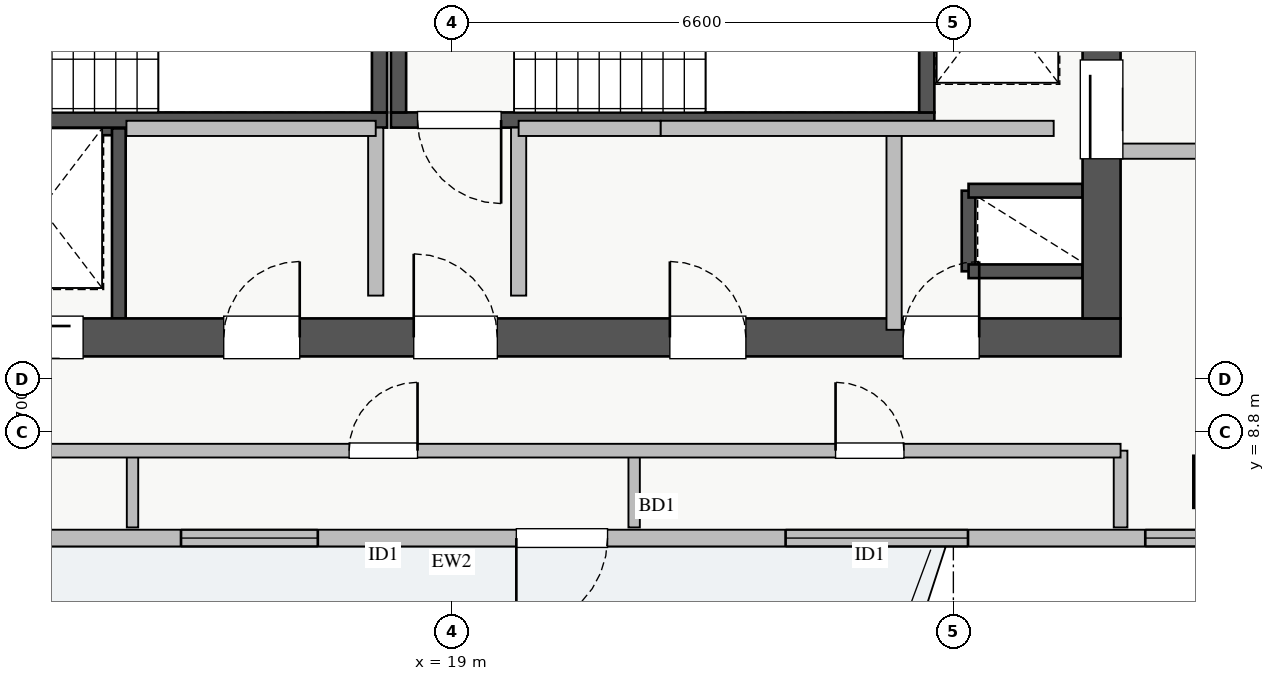
"""IFC4 building model, lengths in metres.
Left out: names, types, materials, properties, quantities, classifications, styles, units other than length and angle.
Written with IfcOpenShell. Run it as: python <this file> out.ifc"""

import sys

from ifc_helpers import new_model, si_unit, direction, frame, frame_2d, origin, origin_2d, place, context, subcontext, project, spatial, rectangle, extrude, source, transform, mapped, element, fill, save


model = new_model("IFC4")
c1 = context("Model", 3, precision=1e-05, world=origin(), true_north=direction((0.0, 1.0)))
c2 = subcontext(c1, "Body", "Model", "MODEL_VIEW")
j1 = project(units=[si_unit("LENGTHUNIT", "METRE"), si_unit("PLANEANGLEUNIT", "RADIAN")], contexts=[c1])
p1 = place(None, origin())
s1 = spatial("IfcSite", under=j1, at=p1, CompositionType="ELEMENT")
p2 = place(p1, origin())
s2 = spatial("IfcBuilding", under=s1, at=p2, CompositionType="ELEMENT")
p3 = place(p2, frame((0.0, 0.0, 256.75)))
s3 = spatial("IfcBuildingStorey", under=s2, at=p3, CompositionType="ELEMENT", Elevation=256.75)
p4 = place(p3, frame((12.68, 12.8, 0.0), z_axis=(0.0, 0.0, 1.0), x_axis=(1.0, 0.0, 0.0)))
e1 = element("IfcWall", 1, at=p4, inside=s3, PredefinedType="SHEAR", context=c2, shape_type="SweptSolid", body=[
    extrude(rectangle(XDim=1.94, YDim=0.18, at=frame_2d((0.97, 0.0))), origin(), (0.0, 0.0, 1.0), 3.07),
])
p5 = place(p3, frame((14.62, 10.3, 0.0), z_axis=(0.0, 0.0, 1.0), x_axis=(0.0, 1.0, 0.0)))
e2 = element("IfcWall", 2, at=p5, inside=s3, PredefinedType="SHEAR", context=c2, shape_type="SweptSolid", body=[
    extrude(rectangle(XDim=2.5, YDim=0.18, at=frame_2d((1.25, 0.0))), origin(), (0.0, 0.0, 1.0), 3.07),
])
p6 = place(p3, frame((25.8, 10.92, 0.0), z_axis=(0.0, 0.0, 1.0), x_axis=(0.0, 1.0, 0.0)))
e3 = element("IfcWall", 3, at=p6, inside=s3, PredefinedType="SHEAR", context=c2, shape_type="SweptSolid", body=[
    extrude(rectangle(XDim=1.06, YDim=0.18, at=frame_2d((0.53, 0.0))), origin(), (0.0, 0.0, 1.0), 3.07),
])
for number, where, z_axis, x_axis in (
    (4, (25.8, 11.98, 0.0), (0.0, 0.0, 1.0), (1.0, 0.0, 0.0)),
    (5, (25.8, 10.92, 0.0), (0.0, 0.0, 1.0), (1.0, 0.0, 0.0)),
):
    element("IfcWall", number, at=place(p3, frame(where, z_axis=z_axis, x_axis=x_axis)), inside=s3, PredefinedType="SHEAR", context=c2, shape_type="SweptSolid", body=[
        extrude(rectangle(XDim=1.5, YDim=0.18, at=frame_2d((0.75, 0.0))), origin(), (0.0, 0.0, 1.0), 3.07),
    ])
p7 = place(p3, frame((10.7, 12.91, 0.0), z_axis=(0.0, 0.0, 1.0), x_axis=(1.0, 0.0, 0.0)))
e6 = element("IfcWall", 6, at=p7, inside=s3, PredefinedType="SHEAR", context=c2, shape_type="SweptSolid", body=[
    extrude(rectangle(XDim=7.45, YDim=0.2, at=frame_2d((3.725, 0.0))), origin(), (0.0, 0.0, 1.0), 3.25),
])
p8 = place(p7, frame((0.35, 0.0, 0.0)))
e7 = element("IfcOpeningElement", 7, at=p8, cuts=e6, PredefinedType="OPENING", context=c2, shape_type="SweptSolid", body=[
    extrude(rectangle(XDim=1.1, YDim=2.05, at=frame_2d((0.55, 1.025))), frame((0.0, 0.11, 0.0), z_axis=(0.0, -1.0, 0.0), x_axis=(1.0, 0.0, 0.0)), (0.0, 0.0, 1.0), 0.22),
])
p9 = place(p3, frame((18.05, 13.01, 0.0), z_axis=(0.0, 0.0, 1.0), x_axis=(0.0, 1.0, 0.0)))
e8 = element("IfcWall", 8, at=p9, inside=s3, PredefinedType="SHEAR", context=c2, shape_type="SweptSolid", body=[
    extrude(rectangle(XDim=2.94, YDim=0.2, at=frame_2d((1.47, 0.0))), origin(), (0.0, 0.0, 1.0), 3.25),
])
p10 = place(p3, frame((18.2, 12.91, 0.0), z_axis=(0.0, 0.0, 1.0), x_axis=(1.0, 0.0, 0.0)))
e9 = element("IfcWall", 9, at=p10, inside=s3, PredefinedType="SHEAR", context=c2, shape_type="SweptSolid", body=[
    extrude(rectangle(XDim=7.15, YDim=0.2, at=frame_2d((3.575, 0.0))), origin(), (0.0, 0.0, 1.0), 3.25),
])
p11 = place(p10, frame((0.35, 0.0, 0.0)))
e10 = element("IfcOpeningElement", 10, at=p11, cuts=e9, PredefinedType="OPENING", context=c2, shape_type="SweptSolid", body=[
    extrude(rectangle(XDim=1.1, YDim=2.05, at=frame_2d((0.55, 1.025))), frame((0.0, 0.11, 0.0), z_axis=(0.0, -1.0, 0.0), x_axis=(1.0, 0.0, 0.0)), (0.0, 0.0, 1.0), 0.22),
])
for number, where, z_axis, x_axis in (
    (11, (18.3, 13.01, 0.0), (0.0, 0.0, 1.0), (0.0, 1.0, 0.0)),
    (12, (25.25, 13.01, 0.0), (0.0, 0.0, 1.0), (0.0, 1.0, 0.0)),
):
    element("IfcWall", number, at=place(p3, frame(where, z_axis=z_axis, x_axis=x_axis)), inside=s3, PredefinedType="SHEAR", context=c2, shape_type="SweptSolid", body=[
        extrude(rectangle(XDim=2.94, YDim=0.2, at=frame_2d((1.47, 0.0))), origin(), (0.0, 0.0, 1.0), 3.25),
    ])
p12 = place(p3, frame((10.2, 10.05, 0.0), z_axis=(0.0, 0.0, 1.0), x_axis=(1.0, 0.0, 0.0)))
e13 = element("IfcWall", 13, at=p12, inside=s3, PredefinedType="SHEAR", context=c2, shape_type="SweptSolid", body=[
    extrude(rectangle(XDim=17.6, YDim=0.5, at=frame_2d((8.8, 0.0))), origin(), (0.0, 0.0, 1.0), 3.25),
])
p13 = place(p12, frame((1.15, 0.0, 0.0)))
e14 = element("IfcOpeningElement", 14, at=p13, cuts=e13, PredefinedType="OPENING", context=c2, shape_type="SweptSolid", body=[
    extrude(rectangle(XDim=1.1, YDim=2.05, at=frame_2d((0.55, 1.025))), frame((0.0, 0.26, 0.0), z_axis=(0.0, -1.0, 0.0), x_axis=(1.0, 0.0, 0.0)), (0.0, 0.0, 1.0), 0.52),
])
p14 = place(p12, frame((8.3, 0.0, 0.0)))
e15 = element("IfcOpeningElement", 15, at=p14, cuts=e13, PredefinedType="OPENING", context=c2, shape_type="SweptSolid", body=[
    extrude(rectangle(XDim=1.1, YDim=2.05, at=frame_2d((0.55, 1.025))), frame((0.0, 0.26, 0.0), z_axis=(0.0, -1.0, 0.0), x_axis=(1.0, 0.0, 0.0)), (0.0, 0.0, 1.0), 0.52),
])
p15 = place(p12, frame((2.85, 0.0, 0.0)))
e16 = element("IfcOpeningElement", 16, at=p15, cuts=e13, PredefinedType="OPENING", context=c2, shape_type="SweptSolid", body=[
    extrude(rectangle(XDim=1.1, YDim=2.05, at=frame_2d((0.55, 1.025))), frame((0.0, 0.26, 0.0), z_axis=(0.0, -1.0, 0.0), x_axis=(1.0, 0.0, 0.0)), (0.0, 0.0, 1.0), 0.52),
])
p16 = place(p12, frame((5.8, 0.0, 0.0)))
e17 = element("IfcOpeningElement", 17, at=p16, cuts=e13, PredefinedType="OPENING", context=c2, shape_type="SweptSolid", body=[
    extrude(rectangle(XDim=1.0, YDim=2.05, at=frame_2d((0.5, 1.025))), frame((0.0, 0.26, 0.0), z_axis=(0.0, -1.0, 0.0), x_axis=(1.0, 0.0, 0.0)), (0.0, 0.0, 1.0), 0.52),
])
p17 = place(p12, frame((14.74, 0.0, 0.0)))
e18 = element("IfcOpeningElement", 18, at=p17, cuts=e13, PredefinedType="OPENING", context=c2, shape_type="SweptSolid", body=[
    extrude(rectangle(XDim=1.0, YDim=2.05, at=frame_2d((0.5, 1.025))), frame((0.0, 0.26, 0.0), z_axis=(0.0, -1.0, 0.0), x_axis=(1.0, 0.0, 0.0)), (0.0, 0.0, 1.0), 0.52),
])
p18 = place(p12, frame((11.67, 0.0, 0.0)))
e19 = element("IfcOpeningElement", 19, at=p18, cuts=e13, PredefinedType="OPENING", context=c2, shape_type="SweptSolid", body=[
    extrude(rectangle(XDim=1.0, YDim=2.05, at=frame_2d((0.5, 1.025))), frame((0.0, 0.26, 0.0), z_axis=(0.0, -1.0, 0.0), x_axis=(1.0, 0.0, 0.0)), (0.0, 0.0, 1.0), 0.52),
])
p19 = place(p3, frame((27.55, 10.3, 0.0), z_axis=(0.0, 0.0, 1.0), x_axis=(0.0, 1.0, 0.0)))
e20 = element("IfcWall", 20, at=p19, inside=s3, PredefinedType="SHEAR", context=c2, shape_type="SweptSolid", body=[
    extrude(rectangle(XDim=6.2, YDim=0.5, at=frame_2d((3.1, 0.0))), origin(), (0.0, 0.0, 1.0), 3.25),
])
p20 = place(p19, frame((2.1, 0.0, 0.0)))
e21 = element("IfcOpeningElement", 21, at=p20, cuts=e20, PredefinedType="OPENING", context=c2, shape_type="SweptSolid", body=[
    extrude(rectangle(XDim=1.3, YDim=2.05, at=frame_2d((0.65, 1.025))), frame((0.0, 0.26, 0.0), z_axis=(0.0, -1.0, 0.0), x_axis=(1.0, 0.0, 0.0)), (0.0, 0.0, 1.0), 0.52),
])
m1 = source(origin(), c2, "Body", "SweptSolid", [
    extrude(rectangle(XDim=0.65, YDim=0.65, at=origin_2d()), origin(), (0.0, 0.0, 1.0), 3.25),
])
p21 = place(p3, frame((29.1, 8.15, 0.0), z_axis=(0.0, 0.0, 1.0), x_axis=(1.0, 0.0, 0.0)))
e22 = element("IfcColumn", 22, at=p21, inside=s3, PredefinedType="COLUMN", context=c2, shape_type="MappedRepresentation", body=[
    mapped(m1, transform((0.0, 0.0, 0.0), x_axis=(1.0, 0.0, 0.0), y_axis=(0.0, 1.0, 0.0), z_axis=(0.0, 0.0, 1.0), scale=1.0)),
])
p22 = place(p3, frame((8.35, 7.41, 0.0), z_axis=(0.0, 0.0, 1.0), x_axis=(1.0, 0.0, 0.0)))
e23 = element("IfcWall", 23, at=p22, inside=s3, PredefinedType="STANDARD", context=c2, shape_type="SweptSolid", body=[
    extrude(rectangle(XDim=21.3, YDim=0.22, at=frame_2d((10.65, 0.0))), origin(), (0.0, 0.0, 1.0), 2.61),
])
p23 = place(p22, frame((11.5, 0.0, 0.0)))
e24 = element("IfcOpeningElement", 24, at=p23, cuts=e23, PredefinedType="OPENING", context=c2, shape_type="SweptSolid", body=[
    extrude(rectangle(XDim=1.2, YDim=2.1, at=frame_2d((0.6, 1.05))), frame((0.0, 0.12, 0.0), z_axis=(0.0, -1.0, 0.0), x_axis=(1.0, 0.0, 0.0)), (0.0, 0.0, 1.0), 0.24),
])
p24 = place(p22, frame((1.463, 0.0, 0.9)))
e25 = element("IfcOpeningElement", 25, at=p24, cuts=e23, PredefinedType="OPENING", context=c2, shape_type="SweptSolid", body=[
    extrude(rectangle(XDim=2.4, YDim=1.48, at=frame_2d((1.2, 0.74))), frame((0.0, 0.12, 0.0), z_axis=(0.0, -1.0, 0.0), x_axis=(1.0, 0.0, 0.0)), (0.0, 0.0, 1.0), 0.24),
])
p25 = place(p22, frame((7.088, 0.0, 0.9)))
e26 = element("IfcOpeningElement", 26, at=p25, cuts=e23, PredefinedType="OPENING", context=c2, shape_type="SweptSolid", body=[
    extrude(rectangle(XDim=1.8, YDim=1.45, at=frame_2d((0.9, 0.725))), frame((0.0, 0.12, 0.0), z_axis=(0.0, -1.0, 0.0), x_axis=(1.0, 0.0, 0.0)), (0.0, 0.0, 1.0), 0.24),
])
p26 = place(p22, frame((19.775, 0.0, 0.9)))
e27 = element("IfcOpeningElement", 27, at=p26, cuts=e23, PredefinedType="OPENING", context=c2, shape_type="SweptSolid", body=[
    extrude(rectangle(XDim=1.2, YDim=1.4, at=frame_2d((0.6, 0.7))), frame((0.0, 0.12, 0.0), z_axis=(0.0, -1.0, 0.0), x_axis=(1.0, 0.0, 0.0)), (0.0, 0.0, 1.0), 0.24),
])
p27 = place(p22, frame((15.042, 0.0, 0.9)))
e28 = element("IfcOpeningElement", 28, at=p27, cuts=e23, PredefinedType="OPENING", context=c2, shape_type="SweptSolid", body=[
    extrude(rectangle(XDim=2.4, YDim=1.5, at=frame_2d((1.2, 0.75))), frame((0.0, 0.12, 0.0), z_axis=(0.0, -1.0, 0.0), x_axis=(1.0, 0.0, 0.0)), (0.0, 0.0, 1.0), 0.24),
])
p28 = place(p3, frame((27.8, 12.5, 0.0), z_axis=(0.0, 0.0, 1.0), x_axis=(1.0, 0.0, 0.0)))
e29 = element("IfcWall", 29, at=p28, inside=s3, PredefinedType="PARTITIONING", context=c2, shape_type="SweptSolid", body=[
    extrude(rectangle(XDim=3.1, YDim=0.2, at=frame_2d((1.55, 0.0))), origin(), (0.0, 0.0, 1.0), 3.07),
])
for number, where, z_axis, x_axis in (
    (30, (18.0, 10.6, 0.0), (0.0, 0.0, 1.0), (0.0, 1.0, 0.0)),
    (31, (19.88, 10.6, 0.0), (0.0, 0.0, 1.0), (0.0, 1.0, 0.0)),
):
    element("IfcWall", number, at=place(p3, frame(where, z_axis=z_axis, x_axis=x_axis)), inside=s3, PredefinedType="PARTITIONING", context=c2, shape_type="SweptSolid", body=[
        extrude(rectangle(XDim=2.21, YDim=0.2, at=frame_2d((1.105, 0.0))), origin(), (0.0, 0.0, 1.0), 3.07),
    ])
p29 = place(p3, frame((14.72, 12.8, 0.0), z_axis=(0.0, 0.0, 1.0), x_axis=(1.0, 0.0, 0.0)))
e32 = element("IfcWall", 32, at=p29, inside=s3, PredefinedType="PARTITIONING", context=c2, shape_type="SweptSolid", body=[
    extrude(rectangle(XDim=3.28, YDim=0.2, at=frame_2d((1.64, 0.0))), origin(), (0.0, 0.0, 1.0), 3.07),
])
p30 = place(p3, frame((24.82, 10.15, 0.0), z_axis=(0.0, 0.0, 1.0), x_axis=(0.0, 1.0, 0.0)))
e33 = element("IfcWall", 33, at=p30, inside=s3, PredefinedType="PARTITIONING", context=c2, shape_type="SweptSolid", body=[
    extrude(rectangle(XDim=2.65, YDim=0.2, at=frame_2d((1.325, 0.0))), origin(), (0.0, 0.0, 1.0), 3.07),
])
p31 = place(p3, frame((19.88, 12.8, 0.0), z_axis=(0.0, 0.0, 1.0), x_axis=(1.0, 0.0, 0.0)))
e34 = element("IfcWall", 34, at=p31, inside=s3, PredefinedType="PARTITIONING", context=c2, shape_type="SweptSolid", body=[
    extrude(rectangle(XDim=1.87, YDim=0.2, at=frame_2d((0.935, 0.0))), origin(), (0.0, 0.0, 1.0), 3.07),
])
p32 = place(p3, frame((21.75, 12.8, 0.0), z_axis=(0.0, 0.0, 1.0), x_axis=(1.0, 0.0, 0.0)))
e35 = element("IfcWall", 35, at=p32, inside=s3, PredefinedType="PARTITIONING", context=c2, shape_type="SweptSolid", body=[
    extrude(rectangle(XDim=5.17, YDim=0.2, at=frame_2d((2.585, 0.0))), origin(), (0.0, 0.0, 1.0), 3.07),
])
p33 = place(p3, frame((27.8, 7.55, 0.0), z_axis=(0.0, 0.0, 1.0), x_axis=(0.0, 1.0, 0.0)))
e36 = element("IfcWall", 36, at=p33, inside=s3, PredefinedType="PARTITIONING", context=c2, shape_type="SweptSolid", body=[
    extrude(rectangle(XDim=1.01, YDim=0.18, at=frame_2d((0.505, 0.0))), origin(), (0.0, 0.0, 1.0), 3.07),
])
for number, where, z_axis, x_axis in (
    (37, (14.8, 7.55, 0.0), (0.0, 0.0, 1.0), (0.0, 1.0, 0.0)),
    (38, (21.4, 7.55, 0.0), (0.0, 0.0, 1.0), (0.0, 1.0, 0.0)),
):
    element("IfcWall", number, at=place(p3, frame(where, z_axis=z_axis, x_axis=x_axis)), inside=s3, PredefinedType="PARTITIONING", context=c2, shape_type="SweptSolid", body=[
        extrude(rectangle(XDim=1.01, YDim=0.15, at=frame_2d((0.505, 0.0))), origin(), (0.0, 0.0, 1.0), 3.07),
    ])
p34 = place(p3, frame((8.85, 8.56, 0.0), z_axis=(0.0, 0.0, 1.0), x_axis=(1.0, 0.0, 0.0)))
e39 = element("IfcWall", 39, at=p34, inside=s3, PredefinedType="PARTITIONING", context=c2, shape_type="SweptSolid", body=[
    extrude(rectangle(XDim=18.95, YDim=0.18, at=frame_2d((9.475, 0.0))), origin(), (0.0, 0.0, 1.0), 3.07),
])
p35 = place(p34, frame((2.8, 0.0, 0.0)))
e40 = element("IfcOpeningElement", 40, at=p35, cuts=e39, PredefinedType="OPENING", context=c2, shape_type="SweptSolid", body=[
    extrude(rectangle(XDim=0.9, YDim=2.05, at=frame_2d((0.45, 1.025))), frame((0.0, 0.1, 0.0), z_axis=(0.0, -1.0, 0.0), x_axis=(1.0, 0.0, 0.0)), (0.0, 0.0, 1.0), 0.2),
])
p36 = place(p34, frame((8.8, 0.0, 0.0)))
e41 = element("IfcOpeningElement", 41, at=p36, cuts=e39, PredefinedType="OPENING", context=c2, shape_type="SweptSolid", body=[
    extrude(rectangle(XDim=0.9, YDim=2.05, at=frame_2d((0.45, 1.025))), frame((0.0, 0.1, 0.0), z_axis=(0.0, -1.0, 0.0), x_axis=(1.0, 0.0, 0.0)), (0.0, 0.0, 1.0), 0.2),
])
p37 = place(p34, frame((15.2, 0.0, 0.0)))
e42 = element("IfcOpeningElement", 42, at=p37, cuts=e39, PredefinedType="OPENING", context=c2, shape_type="SweptSolid", body=[
    extrude(rectangle(XDim=0.9, YDim=2.05, at=frame_2d((0.45, 1.025))), frame((0.0, 0.1, 0.0), z_axis=(0.0, -1.0, 0.0), x_axis=(1.0, 0.0, 0.0)), (0.0, 0.0, 1.0), 0.2),
])
m2 = source(origin(), c2, "Body", "SweptSolid", [
    extrude(rectangle(XDim=1.2, YDim=2.1, at=frame_2d((0.6, 1.05))), frame((0.0, 0.025, 0.0), z_axis=(0.0, -1.0, 0.0), x_axis=(1.0, 0.0, 0.0)), (0.0, 0.0, 1.0), 0.05),
])
p38 = place(p23, frame((1.2, 0.0, 0.0), z_axis=(0.0, 0.0, 1.0), x_axis=(-1.0, 0.0, 0.0)))
e43 = element("IfcDoor", 43, at=p38, inside=s3, OperationType="SINGLE_SWING_LEFT", PredefinedType="DOOR", context=c2, shape_type="MappedRepresentation", body=[
    mapped(m2, transform((0.0, 0.0, 0.0), x_axis=(1.0, 0.0, 0.0), y_axis=(0.0, 1.0, 0.0), z_axis=(0.0, 0.0, 1.0), scale=1.0)),
])
fill(e24, e43)
m3 = source(origin(), c2, "Body", "SweptSolid", [
    extrude(rectangle(XDim=1.8, YDim=1.45, at=frame_2d((0.9, 0.725))), frame((0.0, 0.03, 0.0), z_axis=(0.0, -1.0, 0.0), x_axis=(1.0, 0.0, 0.0)), (0.0, 0.0, 1.0), 0.06),
])
p39 = place(p25, origin())
e44 = element("IfcWindow", 44, at=p39, inside=s3, PartitioningType="DOUBLE_PANEL_VERTICAL", PredefinedType="WINDOW", context=c2, shape_type="MappedRepresentation", body=[
    mapped(m3, transform((0.0, 0.0, 0.0), x_axis=(1.0, 0.0, 0.0), y_axis=(0.0, 1.0, 0.0), z_axis=(0.0, 0.0, 1.0), scale=1.0)),
])
fill(e26, e44)
m4 = source(origin(), c2, "Body", "SweptSolid", [
    extrude(rectangle(XDim=1.2, YDim=1.4, at=frame_2d((0.6, 0.7))), frame((0.0, 0.03, 0.0), z_axis=(0.0, -1.0, 0.0), x_axis=(1.0, 0.0, 0.0)), (0.0, 0.0, 1.0), 0.06),
])
p40 = place(p26, origin())
e45 = element("IfcWindow", 45, at=p40, inside=s3, PartitioningType="TRIPLE_PANEL_VERTICAL", PredefinedType="WINDOW", context=c2, shape_type="MappedRepresentation", body=[
    mapped(m4, transform((0.0, 0.0, 0.0), x_axis=(1.0, 0.0, 0.0), y_axis=(0.0, 1.0, 0.0), z_axis=(0.0, 0.0, 1.0), scale=1.0)),
])
fill(e27, e45)
m5 = source(origin(), c2, "Body", "SweptSolid", [
    extrude(rectangle(XDim=1.3, YDim=2.05, at=frame_2d((0.65, 1.025))), frame((0.0, 0.025, 0.0), z_axis=(0.0, -1.0, 0.0), x_axis=(1.0, 0.0, 0.0)), (0.0, 0.0, 1.0), 0.05),
])
p41 = place(p20, origin())
e46 = element("IfcDoor", 46, at=p41, inside=s3, OperationType="SLIDING_TO_RIGHT", PredefinedType="DOOR", context=c2, shape_type="MappedRepresentation", body=[
    mapped(m5, transform((0.0, 0.0, 0.0), x_axis=(1.0, 0.0, 0.0), y_axis=(0.0, 1.0, 0.0), z_axis=(0.0, 0.0, 1.0), scale=1.0)),
])
fill(e21, e46)
m6 = source(origin(), c2, "Body", "SweptSolid", [
    extrude(rectangle(XDim=1.1, YDim=2.05, at=frame_2d((0.55, 1.025))), frame((0.0, 0.025, 0.0), z_axis=(0.0, -1.0, 0.0), x_axis=(1.0, 0.0, 0.0)), (0.0, 0.0, 1.0), 0.05),
])
p42 = place(p14, origin())
e47 = element("IfcDoor", 47, at=p42, inside=s3, OperationType="SINGLE_SWING_LEFT", PredefinedType="DOOR", context=c2, shape_type="MappedRepresentation", body=[
    mapped(m6, transform((0.0, 0.0, 0.0), x_axis=(1.0, 0.0, 0.0), y_axis=(0.0, 1.0, 0.0), z_axis=(0.0, 0.0, 1.0), scale=1.0)),
])
fill(e15, e47)
p43 = place(p11, frame((1.1, 0.0, 0.0), z_axis=(0.0, 0.0, 1.0), x_axis=(-1.0, 0.0, 0.0)))
e48 = element("IfcDoor", 48, at=p43, inside=s3, OperationType="SINGLE_SWING_RIGHT", PredefinedType="DOOR", context=c2, shape_type="MappedRepresentation", body=[
    mapped(m6, transform((0.0, 0.0, 0.0), x_axis=(1.0, 0.0, 0.0), y_axis=(0.0, 1.0, 0.0), z_axis=(0.0, 0.0, 1.0), scale=1.0)),
])
fill(e10, e48)
p44 = place(p15, origin())
e49 = element("IfcDoor", 49, at=p44, inside=s3, OperationType="SLIDING_TO_RIGHT", PredefinedType="DOOR", context=c2, shape_type="MappedRepresentation", body=[
    mapped(m6, transform((0.0, 0.0, 0.0), x_axis=(1.0, 0.0, 0.0), y_axis=(0.0, 1.0, 0.0), z_axis=(0.0, 0.0, 1.0), scale=1.0)),
])
fill(e16, e49)
m7 = source(origin(), c2, "Body", "SweptSolid", [
    extrude(rectangle(XDim=1.0, YDim=2.05, at=frame_2d((0.5, 1.025))), frame((0.0, 0.025, 0.0), z_axis=(0.0, -1.0, 0.0), x_axis=(1.0, 0.0, 0.0)), (0.0, 0.0, 1.0), 0.05),
])
p45 = place(p16, origin())
e50 = element("IfcDoor", 50, at=p45, inside=s3, OperationType="SINGLE_SWING_RIGHT", PredefinedType="DOOR", context=c2, shape_type="MappedRepresentation", body=[
    mapped(m7, transform((0.0, 0.0, 0.0), x_axis=(1.0, 0.0, 0.0), y_axis=(0.0, 1.0, 0.0), z_axis=(0.0, 0.0, 1.0), scale=1.0)),
])
fill(e17, e50)
p46 = place(p17, origin())
e51 = element("IfcDoor", 51, at=p46, inside=s3, OperationType="SINGLE_SWING_RIGHT", PredefinedType="DOOR", context=c2, shape_type="MappedRepresentation", body=[
    mapped(m7, transform((0.0, 0.0, 0.0), x_axis=(1.0, 0.0, 0.0), y_axis=(0.0, 1.0, 0.0), z_axis=(0.0, 0.0, 1.0), scale=1.0)),
])
fill(e18, e51)
p47 = place(p18, origin())
e52 = element("IfcDoor", 52, at=p47, inside=s3, OperationType="SINGLE_SWING_LEFT", PredefinedType="DOOR", context=c2, shape_type="MappedRepresentation", body=[
    mapped(m7, transform((0.0, 0.0, 0.0), x_axis=(1.0, 0.0, 0.0), y_axis=(0.0, 1.0, 0.0), z_axis=(0.0, 0.0, 1.0), scale=1.0)),
])
fill(e19, e52)
m8 = source(origin(), c2, "Body", "SweptSolid", [
    extrude(rectangle(XDim=0.9, YDim=2.05, at=frame_2d((0.45, 1.025))), frame((0.0, 0.025, 0.0), z_axis=(0.0, -1.0, 0.0), x_axis=(1.0, 0.0, 0.0)), (0.0, 0.0, 1.0), 0.05),
])
p48 = place(p36, origin())
e53 = element("IfcDoor", 53, at=p48, inside=s3, OperationType="SINGLE_SWING_RIGHT", PredefinedType="DOOR", context=c2, shape_type="MappedRepresentation", body=[
    mapped(m8, transform((0.0, 0.0, 0.0), x_axis=(1.0, 0.0, 0.0), y_axis=(0.0, 1.0, 0.0), z_axis=(0.0, 0.0, 1.0), scale=1.0)),
])
fill(e41, e53)
p49 = place(p37, origin())
e54 = element("IfcDoor", 54, at=p49, inside=s3, OperationType="SINGLE_SWING_LEFT", PredefinedType="DOOR", context=c2, shape_type="MappedRepresentation", body=[
    mapped(m8, transform((0.0, 0.0, 0.0), x_axis=(1.0, 0.0, 0.0), y_axis=(0.0, 1.0, 0.0), z_axis=(0.0, 0.0, 1.0), scale=1.0)),
])
fill(e42, e54)
m9 = source(origin(), c2, "Body", "SweptSolid", [
    extrude(rectangle(XDim=2.4, YDim=1.5, at=frame_2d((1.2, 0.75))), frame((0.0, 0.03, 0.0), z_axis=(0.0, -1.0, 0.0), x_axis=(1.0, 0.0, 0.0)), (0.0, 0.0, 1.0), 0.06),
])
p50 = place(p27, origin())
e55 = element("IfcWindow", 55, at=p50, inside=s3, PartitioningType="TRIPLE_PANEL_VERTICAL", PredefinedType="WINDOW", context=c2, shape_type="MappedRepresentation", body=[
    mapped(m9, transform((0.0, 0.0, 0.0), x_axis=(1.0, 0.0, 0.0), y_axis=(0.0, 1.0, 0.0), z_axis=(0.0, 0.0, 1.0), scale=1.0)),
])
fill(e28, e55)
save(model, sys.argv[1])
